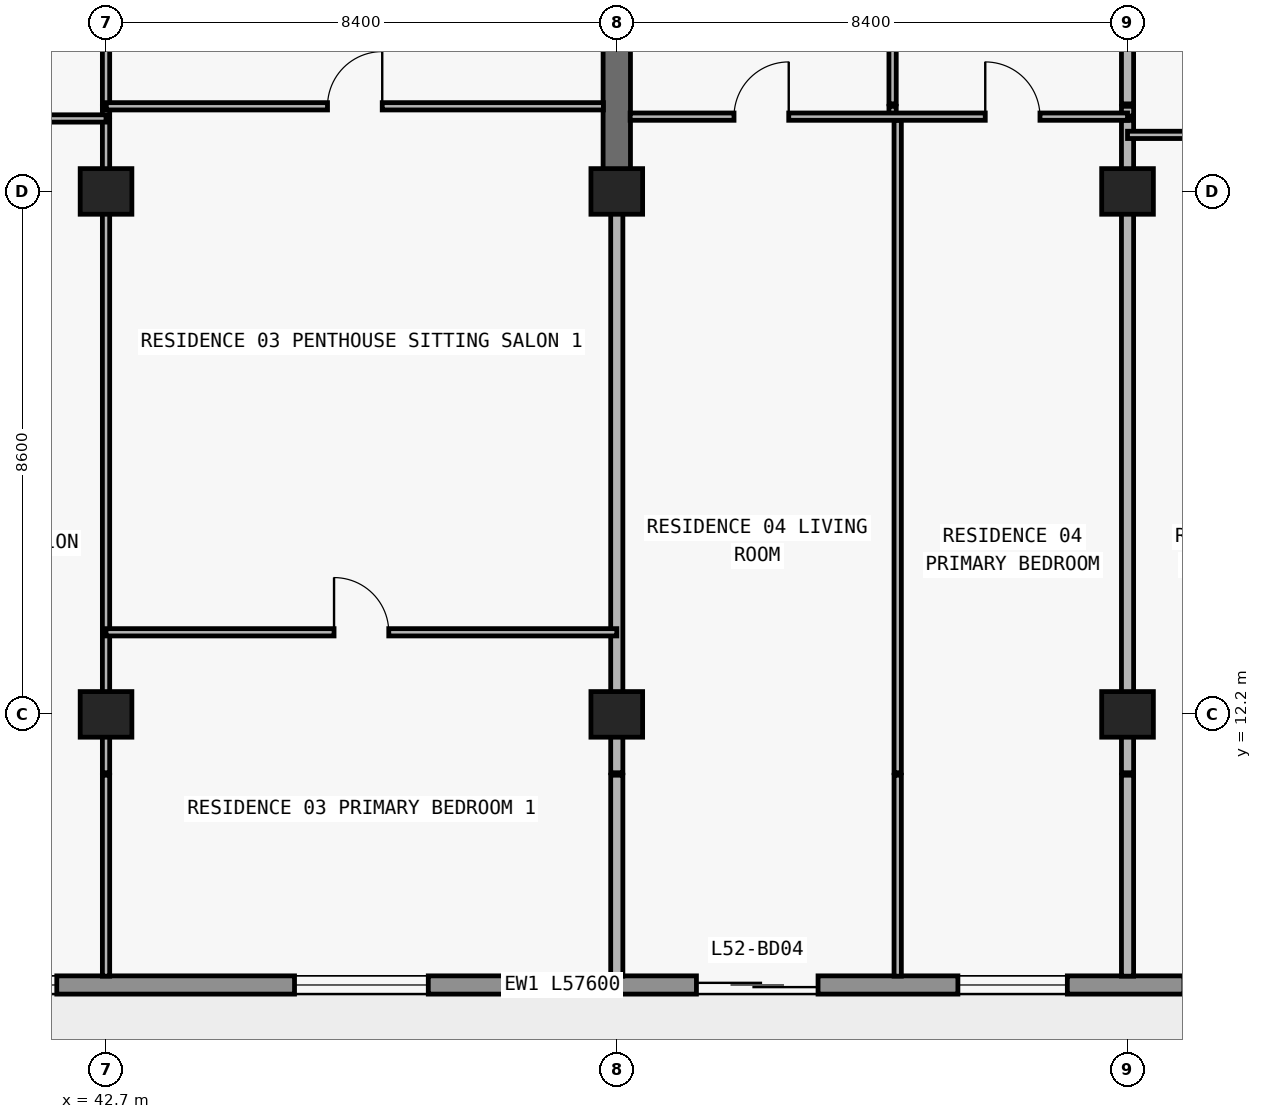
"""IFC4 building model, lengths in metres.
Left out: names, types, materials, properties, quantities, classifications, styles, units other than length and angle.
Written with IfcOpenShell. Run it as: python <this file> out.ifc"""

import sys

from ifc_helpers import new_model, si_unit, direction, frame, frame_2d, origin, origin_2d, place, context, subcontext, project, spatial, rectangle, extrude, element, fill, save


model = new_model("IFC4")
c1 = context("Model", 3, precision=1e-05, world=origin(), true_north=direction((0.0, 1.0)))
c2 = subcontext(c1, "Body", "Model", "MODEL_VIEW")
j1 = project(units=[si_unit("LENGTHUNIT", "METRE"), si_unit("PLANEANGLEUNIT", "RADIAN")], contexts=[c1])
p1 = place(None, origin())
s1 = spatial("IfcSite", under=j1, at=p1, CompositionType="ELEMENT")
p2 = place(p1, origin())
s2 = spatial("IfcBuilding", under=s1, at=p2, CompositionType="ELEMENT")
p3 = place(p2, frame((0.0, 0.0, 188.4)))
s3 = spatial("IfcBuildingStorey", under=s2, at=p3, CompositionType="ELEMENT", Elevation=188.4)
for number, where, z_axis, x_axis in (
    (1, (42.7, 12.2, 0.0), (0.0, 0.0, 1.0), (1.0, 0.0, 0.0)),
    (2, (51.1, 12.2, 0.0), (0.0, 0.0, 1.0), (1.0, 0.0, 0.0)),
    (3, (59.5, 12.2, 0.0), (0.0, 0.0, 1.0), (1.0, 0.0, 0.0)),
    (4, (42.7, 20.8, 0.0), (0.0, 0.0, 1.0), (1.0, 0.0, 0.0)),
    (5, (51.1, 20.8, 0.0), (0.0, 0.0, 1.0), (1.0, 0.0, 0.0)),
    (6, (59.5, 20.8, 0.0), (0.0, 0.0, 1.0), (1.0, 0.0, 0.0)),
):
    element("IfcColumn", number, at=place(p3, frame(where, z_axis=z_axis, x_axis=x_axis)), inside=s3, PredefinedType="COLUMN", context=c2, shape_type="SweptSolid", body=[
        extrude(rectangle(XDim=0.85, YDim=0.75, at=origin_2d()), origin(), (0.0, 0.0, 1.0), 3.05),
    ])
p4 = place(p3, frame((51.1, 20.8, 0.0), z_axis=(0.0, 0.0, 1.0), x_axis=(0.0, 1.0, 0.0)))
e7 = element("IfcWall", 7, at=p4, inside=s3, PredefinedType="SHEAR", context=c2, shape_type="SweptSolid", body=[
    extrude(rectangle(XDim=8.6, YDim=0.45, at=frame_2d((4.3, 0.0))), origin(), (0.0, 0.0, 1.0), 3.05),
])
p5 = place(p3, frame((67.7, 7.75, 0.0), z_axis=(0.0, 0.0, 1.0), x_axis=(-1.0, 0.0, 0.0)))
e8 = element("IfcWall", 8, at=p5, inside=s3, PredefinedType="STANDARD", context=c2, shape_type="SweptSolid", body=[
    extrude(rectangle(XDim=57.6, YDim=0.3, at=frame_2d((28.8, 0.0))), origin(), (0.0, 0.0, 1.0), 3.05),
])
p6 = place(p5, frame((54.69, 0.0, 0.0)))
e9 = element("IfcOpeningElement", 9, at=p6, cuts=e8, PredefinedType="OPENING", context=c2, shape_type="SweptSolid", body=[
    extrude(rectangle(XDim=2.0, YDim=2.3, at=frame_2d((1.0, 1.15))), frame((0.0, 0.16, 0.0), z_axis=(0.0, -1.0, 0.0), x_axis=(1.0, 0.0, 0.0)), (0.0, 0.0, 1.0), 0.32),
])
p7 = place(p5, frame((50.21, 0.0, 0.65)))
e10 = element("IfcOpeningElement", 10, at=p7, cuts=e8, PredefinedType="OPENING", context=c2, shape_type="SweptSolid", body=[
    extrude(rectangle(XDim=2.6, YDim=1.85, at=frame_2d((1.3, 0.925))), frame((0.0, 0.16, 0.0), z_axis=(0.0, -1.0, 0.0), x_axis=(1.0, 0.0, 0.0)), (0.0, 0.0, 1.0), 0.32),
])
p8 = place(p5, frame((44.1, 0.0, 0.85)))
e11 = element("IfcOpeningElement", 11, at=p8, cuts=e8, PredefinedType="OPENING", context=c2, shape_type="SweptSolid", body=[
    extrude(rectangle(XDim=2.2, YDim=1.55, at=frame_2d((1.1, 0.775))), frame((0.0, 0.16, 0.0), z_axis=(0.0, -1.0, 0.0), x_axis=(1.0, 0.0, 0.0)), (0.0, 0.0, 1.0), 0.32),
])
p9 = place(p5, frame((37.69, 0.0, 0.0)))
e12 = element("IfcOpeningElement", 12, at=p9, cuts=e8, PredefinedType="OPENING", context=c2, shape_type="SweptSolid", body=[
    extrude(rectangle(XDim=2.0, YDim=2.3, at=frame_2d((1.0, 1.15))), frame((0.0, 0.16, 0.0), z_axis=(0.0, -1.0, 0.0), x_axis=(1.0, 0.0, 0.0)), (0.0, 0.0, 1.0), 0.32),
])
p10 = place(p5, frame((33.59, 0.0, 0.85)))
e13 = element("IfcOpeningElement", 13, at=p10, cuts=e8, PredefinedType="OPENING", context=c2, shape_type="SweptSolid", body=[
    extrude(rectangle(XDim=1.8, YDim=1.55, at=frame_2d((0.9, 0.775))), frame((0.0, 0.16, 0.0), z_axis=(0.0, -1.0, 0.0), x_axis=(1.0, 0.0, 0.0)), (0.0, 0.0, 1.0), 0.32),
])
p11 = place(p5, frame((29.69, 0.0, 0.0)))
e14 = element("IfcOpeningElement", 14, at=p11, cuts=e8, PredefinedType="OPENING", context=c2, shape_type="SweptSolid", body=[
    extrude(rectangle(XDim=2.0, YDim=2.3, at=frame_2d((1.0, 1.15))), frame((0.0, 0.16, 0.0), z_axis=(0.0, -1.0, 0.0), x_axis=(1.0, 0.0, 0.0)), (0.0, 0.0, 1.0), 0.32),
])
p12 = place(p5, frame((25.81, 0.0, 0.65)))
e15 = element("IfcOpeningElement", 15, at=p12, cuts=e8, PredefinedType="OPENING", context=c2, shape_type="SweptSolid", body=[
    extrude(rectangle(XDim=2.6, YDim=1.85, at=frame_2d((1.3, 0.925))), frame((0.0, 0.16, 0.0), z_axis=(0.0, -1.0, 0.0), x_axis=(1.0, 0.0, 0.0)), (0.0, 0.0, 1.0), 0.32),
])
p13 = place(p5, frame((19.7, 0.0, 0.85)))
e16 = element("IfcOpeningElement", 16, at=p13, cuts=e8, PredefinedType="OPENING", context=c2, shape_type="SweptSolid", body=[
    extrude(rectangle(XDim=2.2, YDim=1.55, at=frame_2d((1.1, 0.775))), frame((0.0, 0.16, 0.0), z_axis=(0.0, -1.0, 0.0), x_axis=(1.0, 0.0, 0.0)), (0.0, 0.0, 1.0), 0.32),
])
p14 = place(p5, frame((13.29, 0.0, 0.0)))
e17 = element("IfcOpeningElement", 17, at=p14, cuts=e8, PredefinedType="OPENING", context=c2, shape_type="SweptSolid", body=[
    extrude(rectangle(XDim=2.0, YDim=2.3, at=frame_2d((1.0, 1.15))), frame((0.0, 0.16, 0.0), z_axis=(0.0, -1.0, 0.0), x_axis=(1.0, 0.0, 0.0)), (0.0, 0.0, 1.0), 0.32),
])
p15 = place(p5, frame((9.19, 0.0, 0.85)))
e18 = element("IfcOpeningElement", 18, at=p15, cuts=e8, PredefinedType="OPENING", context=c2, shape_type="SweptSolid", body=[
    extrude(rectangle(XDim=1.8, YDim=1.55, at=frame_2d((0.9, 0.775))), frame((0.0, 0.16, 0.0), z_axis=(0.0, -1.0, 0.0), x_axis=(1.0, 0.0, 0.0)), (0.0, 0.0, 1.0), 0.32),
])
p16 = place(p5, frame((5.273, 0.0, 0.0)))
e19 = element("IfcOpeningElement", 19, at=p16, cuts=e8, PredefinedType="OPENING", context=c2, shape_type="SweptSolid", body=[
    extrude(rectangle(XDim=2.0, YDim=2.3, at=frame_2d((1.0, 1.15))), frame((0.0, 0.16, 0.0), z_axis=(0.0, -1.0, 0.0), x_axis=(1.0, 0.0, 0.0)), (0.0, 0.0, 1.0), 0.32),
])
p17 = place(p5, frame((1.073, 0.0, 0.85)))
e20 = element("IfcOpeningElement", 20, at=p17, cuts=e8, PredefinedType="OPENING", context=c2, shape_type="SweptSolid", body=[
    extrude(rectangle(XDim=2.2, YDim=1.55, at=frame_2d((1.1, 0.775))), frame((0.0, 0.16, 0.0), z_axis=(0.0, -1.0, 0.0), x_axis=(1.0, 0.0, 0.0)), (0.0, 0.0, 1.0), 0.32),
])
p18 = place(p3, frame((42.7, 7.895, 0.0), z_axis=(0.0, 0.0, 1.0), x_axis=(0.0, 1.0, 0.0)))
e21 = element("IfcWall", 21, at=p18, inside=s3, PredefinedType="PARTITIONING", context=c2, shape_type="SweptSolid", body=[
    extrude(rectangle(XDim=3.305, YDim=0.12, at=frame_2d((1.652, 0.0))), origin(), (0.0, 0.0, 1.0), 3.05),
])
p19 = place(p3, frame((42.7, 11.24, 0.0), z_axis=(0.0, 0.0, 1.0), x_axis=(0.0, 1.0, 0.0)))
e22 = element("IfcWall", 22, at=p19, inside=s3, PredefinedType="PARTITIONING", context=c2, shape_type="SweptSolid", body=[
    extrude(rectangle(XDim=10.73, YDim=0.12, at=frame_2d((5.365, 0.0))), origin(), (0.0, 0.0, 1.0), 2.263),
])
p20 = place(p3, frame((42.7, 22.04, 0.0), z_axis=(0.0, 0.0, 1.0), x_axis=(0.0, 1.0, 0.0)))
e23 = element("IfcWall", 23, at=p20, inside=s3, PredefinedType="PARTITIONING", context=c2, shape_type="SweptSolid", body=[
    extrude(rectangle(XDim=0.16, YDim=0.12, at=frame_2d((0.08, 0.0))), origin(), (0.0, 0.0, 1.0), 2.263),
])
p21 = place(p3, frame((42.7, 22.24, 0.0), z_axis=(0.0, 0.0, 1.0), x_axis=(0.0, 1.0, 0.0)))
e24 = element("IfcWall", 24, at=p21, inside=s3, PredefinedType="PARTITIONING", context=c2, shape_type="SweptSolid", body=[
    extrude(rectangle(XDim=4.36, YDim=0.12, at=frame_2d((2.18, 0.0))), origin(), (0.0, 0.0, 1.0), 2.263),
])
p22 = place(p21, frame((1.73, 0.0, 0.0)))
e25 = element("IfcOpeningElement", 25, at=p22, cuts=e24, PredefinedType="OPENING", context=c2, shape_type="SweptSolid", body=[
    extrude(rectangle(XDim=0.9, YDim=2.15, at=frame_2d((0.45, 1.075))), frame((0.0, 0.07, 0.0), z_axis=(0.0, -1.0, 0.0), x_axis=(1.0, 0.0, 0.0)), (0.0, 0.0, 1.0), 0.14),
])
p23 = place(p3, frame((51.1, 7.895, 0.0), z_axis=(0.0, 0.0, 1.0), x_axis=(0.0, 1.0, 0.0)))
e26 = element("IfcWall", 26, at=p23, inside=s3, PredefinedType="PARTITIONING", context=c2, shape_type="SweptSolid", body=[
    extrude(rectangle(XDim=3.305, YDim=0.2, at=frame_2d((1.652, 0.0))), origin(), (0.0, 0.0, 1.0), 3.05),
])
p24 = place(p3, frame((51.1, 11.24, 0.0), z_axis=(0.0, 0.0, 1.0), x_axis=(0.0, 1.0, 0.0)))
e27 = element("IfcWall", 27, at=p24, inside=s3, PredefinedType="PARTITIONING", context=c2, shape_type="SweptSolid", body=[
    extrude(rectangle(XDim=9.555, YDim=0.2, at=frame_2d((4.777, 0.0))), origin(), (0.0, 0.0, 1.0), 2.263),
])
p25 = place(p3, frame((55.636, 22.04, 0.0), z_axis=(0.0, 0.0, 1.0), x_axis=(0.0, 1.0, 0.0)))
e28 = element("IfcWall", 28, at=p25, inside=s3, PredefinedType="PARTITIONING", context=c2, shape_type="SweptSolid", body=[
    extrude(rectangle(XDim=0.16, YDim=0.12, at=frame_2d((0.08, 0.0))), origin(), (0.0, 0.0, 1.0), 3.05),
])
p26 = place(p3, frame((55.636, 22.24, 0.0), z_axis=(0.0, 0.0, 1.0), x_axis=(0.0, 1.0, 0.0)))
e29 = element("IfcWall", 29, at=p26, inside=s3, PredefinedType="PARTITIONING", context=c2, shape_type="SweptSolid", body=[
    extrude(rectangle(XDim=4.36, YDim=0.12, at=frame_2d((2.18, 0.0))), origin(), (0.0, 0.0, 1.0), 3.05),
])
p27 = place(p26, frame((1.73, 0.0, 0.0)))
e30 = element("IfcOpeningElement", 30, at=p27, cuts=e29, PredefinedType="OPENING", context=c2, shape_type="SweptSolid", body=[
    extrude(rectangle(XDim=0.9, YDim=2.15, at=frame_2d((0.45, 1.075))), frame((0.0, 0.07, 0.0), z_axis=(0.0, -1.0, 0.0), x_axis=(1.0, 0.0, 0.0)), (0.0, 0.0, 1.0), 0.14),
])
p28 = place(p3, frame((55.72, 7.895, 0.0), z_axis=(0.0, 0.0, 1.0), x_axis=(0.0, 1.0, 0.0)))
e31 = element("IfcWall", 31, at=p28, inside=s3, PredefinedType="PARTITIONING", context=c2, shape_type="SweptSolid", body=[
    extrude(rectangle(XDim=3.305, YDim=0.12, at=frame_2d((1.652, 0.0))), origin(), (0.0, 0.0, 1.0), 3.05),
])
p29 = place(p3, frame((55.72, 11.24, 0.0), z_axis=(0.0, 0.0, 1.0), x_axis=(0.0, 1.0, 0.0)))
e32 = element("IfcWall", 32, at=p29, inside=s3, PredefinedType="PARTITIONING", context=c2, shape_type="SweptSolid", body=[
    extrude(rectangle(XDim=10.73, YDim=0.12, at=frame_2d((5.365, 0.0))), origin(), (0.0, 0.0, 1.0), 3.05),
])
p30 = place(p3, frame((59.5, 7.895, 0.0), z_axis=(0.0, 0.0, 1.0), x_axis=(0.0, 1.0, 0.0)))
e33 = element("IfcWall", 33, at=p30, inside=s3, PredefinedType="PARTITIONING", context=c2, shape_type="SweptSolid", body=[
    extrude(rectangle(XDim=3.305, YDim=0.2, at=frame_2d((1.652, 0.0))), origin(), (0.0, 0.0, 1.0), 3.05),
])
p31 = place(p3, frame((59.5, 11.24, 0.0), z_axis=(0.0, 0.0, 1.0), x_axis=(0.0, 1.0, 0.0)))
e34 = element("IfcWall", 34, at=p31, inside=s3, PredefinedType="PARTITIONING", context=c2, shape_type="SweptSolid", body=[
    extrude(rectangle(XDim=10.73, YDim=0.2, at=frame_2d((5.365, 0.0))), origin(), (0.0, 0.0, 1.0), 2.263),
])
p32 = place(p3, frame((59.5, 22.04, 0.0), z_axis=(0.0, 0.0, 1.0), x_axis=(0.0, 1.0, 0.0)))
e35 = element("IfcWall", 35, at=p32, inside=s3, PredefinedType="PARTITIONING", context=c2, shape_type="SweptSolid", body=[
    extrude(rectangle(XDim=0.16, YDim=0.2, at=frame_2d((0.08, 0.0))), origin(), (0.0, 0.0, 1.0), 2.263),
])
p33 = place(p3, frame((59.5, 22.24, 0.0), z_axis=(0.0, 0.0, 1.0), x_axis=(0.0, 1.0, 0.0)))
e36 = element("IfcWall", 36, at=p33, inside=s3, PredefinedType="PARTITIONING", context=c2, shape_type="SweptSolid", body=[
    extrude(rectangle(XDim=4.36, YDim=0.2, at=frame_2d((2.18, 0.0))), origin(), (0.0, 0.0, 1.0), 2.263),
])
p34 = place(p3, frame((42.7, 13.55, 0.0), z_axis=(0.0, 0.0, 1.0), x_axis=(1.0, 0.0, 0.0)))
e37 = element("IfcWall", 37, at=p34, inside=s3, PredefinedType="PARTITIONING", context=c2, shape_type="SweptSolid", body=[
    extrude(rectangle(XDim=8.4, YDim=0.12, at=frame_2d((4.2, 0.0))), origin(), (0.0, 0.0, 1.0), 3.05),
])
p35 = place(p34, frame((3.75, 0.0, 0.0)))
e38 = element("IfcOpeningElement", 38, at=p35, cuts=e37, PredefinedType="OPENING", context=c2, shape_type="SweptSolid", body=[
    extrude(rectangle(XDim=0.9, YDim=2.15, at=frame_2d((0.45, 1.075))), frame((0.0, 0.07, 0.0), z_axis=(0.0, -1.0, 0.0), x_axis=(1.0, 0.0, 0.0)), (0.0, 0.0, 1.0), 0.14),
])
p36 = place(p3, frame((59.5, 21.73, 0.0), z_axis=(0.0, 0.0, 1.0), x_axis=(1.0, 0.0, 0.0)))
e39 = element("IfcWall", 39, at=p36, inside=s3, PredefinedType="PARTITIONING", context=c2, shape_type="SweptSolid", body=[
    extrude(rectangle(XDim=8.2, YDim=0.12, at=frame_2d((4.1, 0.0))), origin(), (0.0, 0.0, 1.0), 3.05),
])
p37 = place(p36, frame((1.477, 0.0, 0.0)))
e40 = element("IfcOpeningElement", 40, at=p37, cuts=e39, PredefinedType="OPENING", context=c2, shape_type="SweptSolid", body=[
    extrude(rectangle(XDim=0.9, YDim=2.15, at=frame_2d((0.45, 1.075))), frame((0.0, 0.07, 0.0), z_axis=(0.0, -1.0, 0.0), x_axis=(1.0, 0.0, 0.0)), (0.0, 0.0, 1.0), 0.14),
])
p38 = place(p36, frame((5.989, 0.0, 0.0)))
e41 = element("IfcOpeningElement", 41, at=p38, cuts=e39, PredefinedType="OPENING", context=c2, shape_type="SweptSolid", body=[
    extrude(rectangle(XDim=0.9, YDim=2.15, at=frame_2d((0.45, 1.075))), frame((0.0, 0.07, 0.0), z_axis=(0.0, -1.0, 0.0), x_axis=(1.0, 0.0, 0.0)), (0.0, 0.0, 1.0), 0.14),
])
p39 = place(p3, frame((35.105, 22.0, 0.0), z_axis=(0.0, 0.0, 1.0), x_axis=(1.0, 0.0, 0.0)))
e42 = element("IfcWall", 42, at=p39, inside=s3, PredefinedType="PARTITIONING", context=c2, shape_type="SweptSolid", body=[
    extrude(rectangle(XDim=7.595, YDim=0.12, at=frame_2d((3.797, 0.0))), origin(), (0.0, 0.0, 1.0), 3.05),
])
p40 = place(p39, frame((3.347, 0.0, 0.0)))
e43 = element("IfcOpeningElement", 43, at=p40, cuts=e42, PredefinedType="OPENING", context=c2, shape_type="SweptSolid", body=[
    extrude(rectangle(XDim=0.9, YDim=2.15, at=frame_2d((0.45, 1.075))), frame((0.0, 0.07, 0.0), z_axis=(0.0, -1.0, 0.0), x_axis=(1.0, 0.0, 0.0)), (0.0, 0.0, 1.0), 0.14),
])
p41 = place(p3, frame((51.32, 22.03, 0.0), z_axis=(0.0, 0.0, 1.0), x_axis=(1.0, 0.0, 0.0)))
e44 = element("IfcWall", 44, at=p41, inside=s3, PredefinedType="PARTITIONING", context=c2, shape_type="SweptSolid", body=[
    extrude(rectangle(XDim=8.18, YDim=0.12, at=frame_2d((4.09, 0.0))), origin(), (0.0, 0.0, 1.0), 3.05),
])
p42 = place(p41, frame((1.708, 0.0, 0.0)))
e45 = element("IfcOpeningElement", 45, at=p42, cuts=e44, PredefinedType="OPENING", context=c2, shape_type="SweptSolid", body=[
    extrude(rectangle(XDim=0.9, YDim=2.15, at=frame_2d((0.45, 1.075))), frame((0.0, 0.07, 0.0), z_axis=(0.0, -1.0, 0.0), x_axis=(1.0, 0.0, 0.0)), (0.0, 0.0, 1.0), 0.14),
])
p43 = place(p41, frame((5.84, 0.0, 0.0)))
e46 = element("IfcOpeningElement", 46, at=p43, cuts=e44, PredefinedType="OPENING", context=c2, shape_type="SweptSolid", body=[
    extrude(rectangle(XDim=0.9, YDim=2.15, at=frame_2d((0.45, 1.075))), frame((0.0, 0.07, 0.0), z_axis=(0.0, -1.0, 0.0), x_axis=(1.0, 0.0, 0.0)), (0.0, 0.0, 1.0), 0.14),
])
p44 = place(p3, frame((42.705, 22.2, 0.0), z_axis=(0.0, 0.0, 1.0), x_axis=(1.0, 0.0, 0.0)))
e47 = element("IfcWall", 47, at=p44, inside=s3, PredefinedType="PARTITIONING", context=c2, shape_type="SweptSolid", body=[
    extrude(rectangle(XDim=8.175, YDim=0.12, at=frame_2d((4.087, 0.0))), origin(), (0.0, 0.0, 1.0), 3.05),
])
p45 = place(p44, frame((3.637, 0.0, 0.0)))
e48 = element("IfcOpeningElement", 48, at=p45, cuts=e47, PredefinedType="OPENING", context=c2, shape_type="SweptSolid", body=[
    extrude(rectangle(XDim=0.9, YDim=2.15, at=frame_2d((0.45, 1.075))), frame((0.0, 0.07, 0.0), z_axis=(0.0, -1.0, 0.0), x_axis=(1.0, 0.0, 0.0)), (0.0, 0.0, 1.0), 0.14),
])
p46 = place(p12, origin())
e49 = element("IfcWindow", 49, at=p46, inside=s3, PartitioningType="SINGLE_PANEL", PredefinedType="WINDOW", context=c2, shape_type="SweptSolid", body=[
    extrude(rectangle(XDim=2.6, YDim=1.85, at=frame_2d((1.3, 0.925))), frame((0.0, 0.03, 0.0), z_axis=(0.0, -1.0, 0.0), x_axis=(1.0, 0.0, 0.0)), (0.0, 0.0, 1.0), 0.06),
])
fill(e15, e49)
p47 = place(p13, origin())
e50 = element("IfcWindow", 50, at=p47, inside=s3, PartitioningType="SINGLE_PANEL", PredefinedType="WINDOW", context=c2, shape_type="SweptSolid", body=[
    extrude(rectangle(XDim=2.2, YDim=1.55, at=frame_2d((1.1, 0.775))), frame((0.0, 0.03, 0.0), z_axis=(0.0, -1.0, 0.0), x_axis=(1.0, 0.0, 0.0)), (0.0, 0.0, 1.0), 0.06),
])
fill(e16, e50)
p48 = place(p14, origin())
e51 = element("IfcDoor", 51, at=p48, inside=s3, OperationType="DOUBLE_DOOR_SLIDING", PredefinedType="DOOR", context=c2, shape_type="SweptSolid", body=[
    extrude(rectangle(XDim=2.0, YDim=2.3, at=frame_2d((1.0, 1.15))), frame((0.0, 0.025, 0.0), z_axis=(0.0, -1.0, 0.0), x_axis=(1.0, 0.0, 0.0)), (0.0, 0.0, 1.0), 0.05),
])
fill(e17, e51)
p49 = place(p15, origin())
e52 = element("IfcWindow", 52, at=p49, inside=s3, PartitioningType="SINGLE_PANEL", PredefinedType="WINDOW", context=c2, shape_type="SweptSolid", body=[
    extrude(rectangle(XDim=1.8, YDim=1.55, at=frame_2d((0.9, 0.775))), frame((0.0, 0.03, 0.0), z_axis=(0.0, -1.0, 0.0), x_axis=(1.0, 0.0, 0.0)), (0.0, 0.0, 1.0), 0.06),
])
fill(e18, e52)
p50 = place(p45, origin())
e53 = element("IfcDoor", 53, at=p50, inside=s3, OperationType="SINGLE_SWING_RIGHT", PredefinedType="DOOR", context=c2, shape_type="SweptSolid", body=[
    extrude(rectangle(XDim=0.9, YDim=2.15, at=frame_2d((0.45, 1.075))), frame((0.0, 0.025, 0.0), z_axis=(0.0, -1.0, 0.0), x_axis=(1.0, 0.0, 0.0)), (0.0, 0.0, 1.0), 0.05),
])
fill(e48, e53)
p51 = place(p35, origin())
e54 = element("IfcDoor", 54, at=p51, inside=s3, OperationType="SINGLE_SWING_LEFT", PredefinedType="DOOR", context=c2, shape_type="SweptSolid", body=[
    extrude(rectangle(XDim=0.9, YDim=2.15, at=frame_2d((0.45, 1.075))), frame((0.0, 0.025, 0.0), z_axis=(0.0, -1.0, 0.0), x_axis=(1.0, 0.0, 0.0)), (0.0, 0.0, 1.0), 0.05),
])
fill(e38, e54)
p52 = place(p42, origin())
e55 = element("IfcDoor", 55, at=p52, inside=s3, OperationType="SINGLE_SWING_RIGHT", PredefinedType="DOOR", context=c2, shape_type="SweptSolid", body=[
    extrude(rectangle(XDim=0.9, YDim=2.15, at=frame_2d((0.45, 1.075))), frame((0.0, 0.025, 0.0), z_axis=(0.0, -1.0, 0.0), x_axis=(1.0, 0.0, 0.0)), (0.0, 0.0, 1.0), 0.05),
])
fill(e45, e55)
p53 = place(p43, origin())
e56 = element("IfcDoor", 56, at=p53, inside=s3, OperationType="SINGLE_SWING_LEFT", PredefinedType="DOOR", context=c2, shape_type="SweptSolid", body=[
    extrude(rectangle(XDim=0.9, YDim=2.15, at=frame_2d((0.45, 1.075))), frame((0.0, 0.025, 0.0), z_axis=(0.0, -1.0, 0.0), x_axis=(1.0, 0.0, 0.0)), (0.0, 0.0, 1.0), 0.05),
])
fill(e46, e56)
save(model, sys.argv[1])
